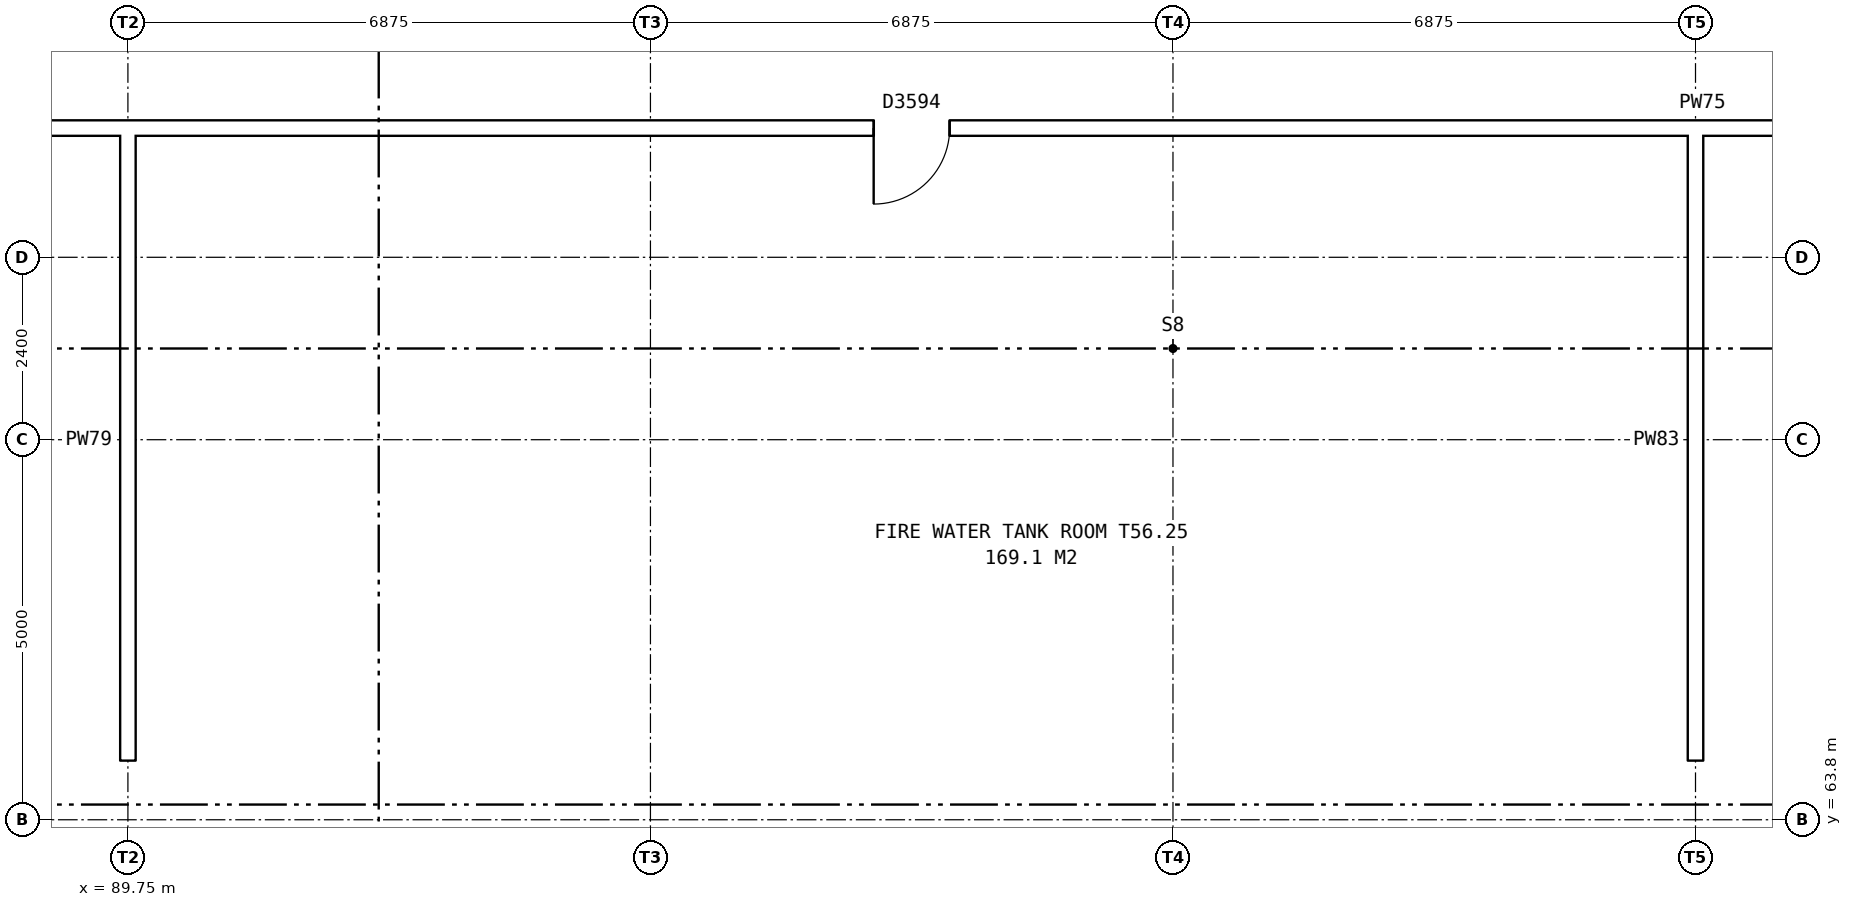
"""IFC4 building model, lengths in metres.
Left out: names, types, materials, properties, quantities, classifications, styles, units other than length and angle.
Written with IfcOpenShell. Run it as: python <this file> out.ifc"""

import sys

from ifc_helpers import new_model, si_unit, direction, frame, frame_2d, origin, place, context, subcontext, project, spatial, rectangle, extrude, element, fill, save


model = new_model("IFC4")
c1 = context("Model", 3, precision=1e-05, world=origin(), true_north=direction((0.0, 1.0)))
c2 = subcontext(c1, "Body", "Model", "MODEL_VIEW")
j1 = project(units=[si_unit("LENGTHUNIT", "METRE"), si_unit("PLANEANGLEUNIT", "RADIAN")], contexts=[c1])
p1 = place(None, origin())
s1 = spatial("IfcSite", under=j1, at=p1, CompositionType="ELEMENT")
p2 = place(p1, origin())
s2 = spatial("IfcBuilding", under=s1, at=p2, CompositionType="ELEMENT")
p3 = place(p2, frame((0.0, 0.0, 198.6)))
s3 = spatial("IfcBuildingStorey", under=s2, at=p3, CompositionType="ELEMENT", Elevation=198.6)
p4 = place(p3, frame((75.64, 72.9, 0.0), z_axis=(0.0, 0.0, 1.0), x_axis=(1.0, 0.0, 0.0)))
e1 = element("IfcWall", 1, at=p4, inside=s3, PredefinedType="PARTITIONING", context=c2, shape_type="SweptSolid", body=[
    extrude(rectangle(XDim=55.72, YDim=0.2, at=frame_2d((27.86, 0.0))), origin(), (0.0, 0.0, 1.0), 3.7),
])
p5 = place(p4, frame((6.555, 0.0, 0.0)))
e2 = element("IfcOpeningElement", 2, at=p5, cuts=e1, PredefinedType="OPENING", context=c2, shape_type="SweptSolid", body=[
    extrude(rectangle(XDim=1.0, YDim=2.1, at=frame_2d((0.5, 1.05))), frame((0.0, 0.11, 0.0), z_axis=(0.0, -1.0, 0.0), x_axis=(1.0, 0.0, 0.0)), (0.0, 0.0, 1.0), 0.22),
])
p6 = place(p4, frame((23.922, 0.0, 0.0)))
e3 = element("IfcOpeningElement", 3, at=p6, cuts=e1, PredefinedType="OPENING", context=c2, shape_type="SweptSolid", body=[
    extrude(rectangle(XDim=1.0, YDim=2.1, at=frame_2d((0.5, 1.05))), frame((0.0, 0.11, 0.0), z_axis=(0.0, -1.0, 0.0), x_axis=(1.0, 0.0, 0.0)), (0.0, 0.0, 1.0), 0.22),
])
p7 = place(p4, frame((44.728, 0.0, 0.0)))
e4 = element("IfcOpeningElement", 4, at=p7, cuts=e1, PredefinedType="OPENING", context=c2, shape_type="SweptSolid", body=[
    extrude(rectangle(XDim=1.0, YDim=2.1, at=frame_2d((0.5, 1.05))), frame((0.0, 0.11, 0.0), z_axis=(0.0, -1.0, 0.0), x_axis=(1.0, 0.0, 0.0)), (0.0, 0.0, 1.0), 0.22),
])
for number, where, z_axis, x_axis in (
    (5, (89.75, 64.58, 0.0), (0.0, 0.0, 1.0), (0.0, 1.0, 0.0)),
    (6, (110.375, 64.58, 0.0), (0.0, 0.0, 1.0), (0.0, 1.0, 0.0)),
):
    element("IfcWall", number, at=place(p3, frame(where, z_axis=z_axis, x_axis=x_axis)), inside=s3, PredefinedType="PARTITIONING", context=c2, shape_type="SweptSolid", body=[
        extrude(rectangle(XDim=8.42, YDim=0.2, at=frame_2d((4.21, 0.0))), origin(), (0.0, 0.0, 1.0), 3.088),
    ])
p8 = place(p6, frame((1.0, 0.0, 0.0), z_axis=(0.0, 0.0, 1.0), x_axis=(-1.0, 0.0, 0.0)))
e7 = element("IfcDoor", 7, at=p8, inside=s3, OperationType="SINGLE_SWING_RIGHT", PredefinedType="DOOR", context=c2, shape_type="SweptSolid", body=[
    extrude(rectangle(XDim=1.0, YDim=2.1, at=frame_2d((0.5, 1.05))), frame((0.0, 0.025, 0.0), z_axis=(0.0, -1.0, 0.0), x_axis=(1.0, 0.0, 0.0)), (0.0, 0.0, 1.0), 0.05),
])
fill(e3, e7)
save(model, sys.argv[1])
